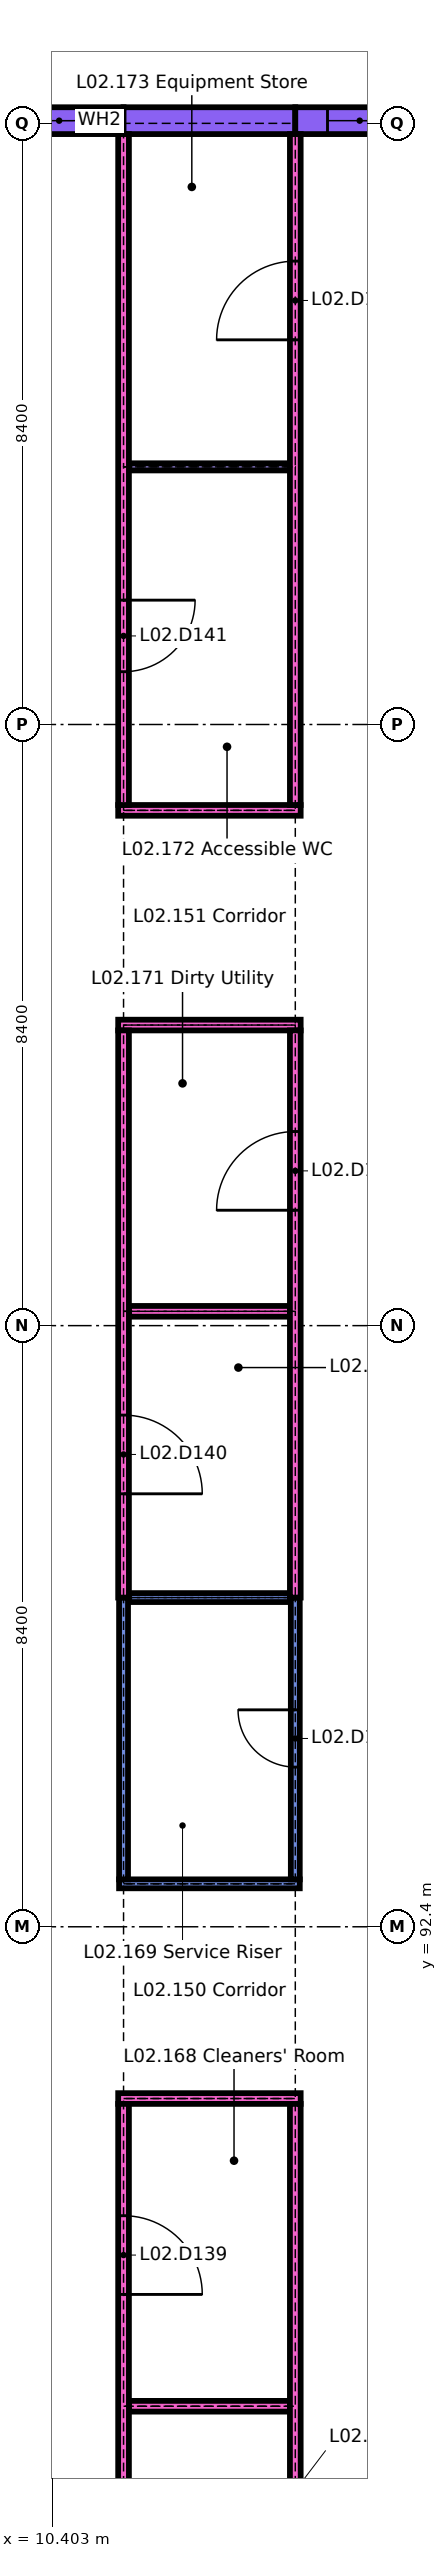
"""IFC4 building model, lengths in metres.
Left out: names, types, materials, properties, quantities, classifications, styles, units other than length and angle.
Written with IfcOpenShell. Run it as: python <this file> out.ifc"""

import sys

from ifc_helpers import new_model, si_unit, direction, frame, frame_2d, origin, place, context, subcontext, project, spatial, rectangle, extrude, element, fill, save


model = new_model("IFC4")
c1 = context("Model", 3, precision=1e-05, world=origin(), true_north=direction((0.0, 1.0)))
c2 = subcontext(c1, "Body", "Model", "MODEL_VIEW")
j1 = project(units=[si_unit("LENGTHUNIT", "METRE"), si_unit("PLANEANGLEUNIT", "RADIAN")], contexts=[c1])
p1 = place(None, origin())
s1 = spatial("IfcSite", under=j1, at=p1, CompositionType="ELEMENT")
p2 = place(p1, origin())
s2 = spatial("IfcBuilding", under=s1, at=p2, CompositionType="ELEMENT")
p3 = place(p2, frame((0.0, 0.0, 8.4)))
s3 = spatial("IfcBuildingStorey", under=s2, at=p3, CompositionType="ELEMENT", Elevation=8.4)
p4 = place(p3, frame((8.825, 117.637, 0.0), z_axis=(0.0, 0.0, 1.0), x_axis=(1.0, 0.0, 0.0)))
e1 = element("IfcWall", 1, at=p4, inside=s3, PredefinedType="SOLIDWALL", context=c2, shape_type="SweptSolid", body=[
    extrude(rectangle(XDim=2.575, YDim=0.375, at=frame_2d((1.288, 0.0))), origin(), (0.0, 0.0, 1.0), 4.2),
])
p5 = place(p4, frame((1.225, 0.0, 0.9)))
e2 = element("IfcOpeningElement", 2, at=p5, cuts=e1, PredefinedType="OPENING", context=c2, shape_type="SweptSolid", body=[
    extrude(rectangle(XDim=0.9, YDim=2.1, at=frame_2d((0.45, 1.05))), frame((0.0, 0.198, 0.0), z_axis=(0.0, -1.0, 0.0), x_axis=(1.0, 0.0, 0.0)), (0.0, 0.0, 1.0), 0.395),
])
p6 = place(p3, frame((11.4, 117.637, 0.0), z_axis=(0.0, 0.0, 1.0), x_axis=(1.0, 0.0, 0.0)))
e3 = element("IfcWall", 3, at=p6, inside=s3, PredefinedType="SOLIDWALL", context=c2, shape_type="SweptSolid", body=[
    extrude(rectangle(XDim=2.4, YDim=0.375, at=frame_2d((1.2, 0.0))), origin(), (0.0, 0.0, 1.0), 4.2),
])
p7 = place(p3, frame((13.8, 117.637, 0.0), z_axis=(0.0, 0.0, 1.0), x_axis=(1.0, 0.0, 0.0)))
e4 = element("IfcWall", 4, at=p7, inside=s3, PredefinedType="SOLIDWALL", context=c2, shape_type="SweptSolid", body=[
    extrude(rectangle(XDim=3.0, YDim=0.375, at=frame_2d((1.5, 0.0))), origin(), (0.0, 0.0, 1.0), 4.2),
])
p8 = place(p7, frame((0.45, 0.0, 0.9)))
e5 = element("IfcOpeningElement", 5, at=p8, cuts=e4, PredefinedType="OPENING", context=c2, shape_type="SweptSolid", body=[
    extrude(rectangle(XDim=0.9, YDim=2.1, at=frame_2d((0.45, 1.05))), frame((0.0, 0.198, 0.0), z_axis=(0.0, -1.0, 0.0), x_axis=(1.0, 0.0, 0.0)), (0.0, 0.0, 1.0), 0.395),
])
p9 = place(p3, frame((11.475, 85.7, 0.0), z_axis=(0.0, 0.0, 1.0), x_axis=(1.0, 0.0, 0.0)))
e6 = element("IfcWall", 6, at=p9, inside=s3, PredefinedType="PARTITIONING", context=c2, shape_type="SweptSolid", body=[
    extrude(rectangle(XDim=2.25, YDim=0.15, at=frame_2d((1.125, 0.0))), origin(), (0.0, 0.0, 1.0), 4.2),
])
p10 = place(p3, frame((11.325, 90.0, 0.0), z_axis=(0.0, 0.0, 1.0), x_axis=(1.0, 0.0, 0.0)))
e7 = element("IfcWall", 7, at=p10, inside=s3, PredefinedType="PARTITIONING", context=c2, shape_type="SweptSolid", body=[
    extrude(rectangle(XDim=2.55, YDim=0.15, at=frame_2d((1.275, 0.0))), origin(), (0.0, 0.0, 1.0), 4.2),
])
p11 = place(p3, frame((11.337, 93.0, 0.0), z_axis=(0.0, 0.0, 1.0), x_axis=(1.0, 0.0, 0.0)))
e8 = element("IfcWall", 8, at=p11, inside=s3, PredefinedType="SOLIDWALL", context=c2, shape_type="SweptSolid", body=[
    extrude(rectangle(XDim=2.525, YDim=0.125, at=frame_2d((1.263, 0.0))), origin(), (0.0, 0.0, 1.0), 4.2),
])
p12 = place(p3, frame((11.475, 97.0, 0.0), z_axis=(0.0, 0.0, 1.0), x_axis=(1.0, 0.0, 0.0)))
e9 = element("IfcWall", 9, at=p12, inside=s3, PredefinedType="SOLIDWALL", context=c2, shape_type="SweptSolid", body=[
    extrude(rectangle(XDim=2.25, YDim=0.125, at=frame_2d((1.125, 0.0))), origin(), (0.0, 0.0, 1.0), 4.2),
])
p13 = place(p3, frame((11.475, 101.0, 0.0), z_axis=(0.0, 0.0, 1.0), x_axis=(1.0, 0.0, 0.0)))
e10 = element("IfcWall", 10, at=p13, inside=s3, PredefinedType="PARTITIONING", context=c2, shape_type="SweptSolid", body=[
    extrude(rectangle(XDim=2.25, YDim=0.15, at=frame_2d((1.125, 0.0))), origin(), (0.0, 0.0, 1.0), 4.2),
])
for number, where, z_axis, x_axis in (
    (11, (11.325, 105.0, 0.0), (0.0, 0.0, 1.0), (1.0, 0.0, 0.0)),
    (12, (11.325, 108.0, 0.0), (0.0, 0.0, 1.0), (1.0, 0.0, 0.0)),
):
    element("IfcWall", number, at=place(p3, frame(where, z_axis=z_axis, x_axis=x_axis)), inside=s3, PredefinedType="PARTITIONING", context=c2, shape_type="SweptSolid", body=[
        extrude(rectangle(XDim=2.55, YDim=0.15, at=frame_2d((1.275, 0.0))), origin(), (0.0, 0.0, 1.0), 4.2),
    ])
p14 = place(p3, frame((11.475, 112.8, 0.0), z_axis=(0.0, 0.0, 1.0), x_axis=(1.0, 0.0, 0.0)))
e13 = element("IfcWall", 13, at=p14, inside=s3, PredefinedType="PARTITIONING", context=c2, shape_type="SweptSolid", body=[
    extrude(rectangle(XDim=2.25, YDim=0.1, at=frame_2d((1.125, 0.0))), origin(), (0.0, 0.0, 1.0), 4.2),
])
p15 = place(p3, frame((11.4, 57.075, 0.0), z_axis=(0.0, 0.0, 1.0), x_axis=(0.0, 1.0, 0.0)))
e14 = element("IfcWall", 14, at=p15, inside=s3, PredefinedType="PARTITIONING", context=c2, shape_type="SweptSolid", body=[
    extrude(rectangle(XDim=32.85, YDim=0.15, at=frame_2d((16.425, 0.0))), origin(), (0.0, 0.0, 1.0), 4.2),
])
p16 = place(p15, frame((5.525, 0.0, 0.0)))
e15 = element("IfcOpeningElement", 15, at=p16, cuts=e14, PredefinedType="OPENING", context=c2, shape_type="SweptSolid", body=[
    extrude(rectangle(XDim=1.1, YDim=2.1, at=frame_2d((0.55, 1.05))), frame((0.0, 0.085, 0.0), z_axis=(0.0, -1.0, 0.0), x_axis=(1.0, 0.0, 0.0)), (0.0, 0.0, 1.0), 0.17),
])
p17 = place(p15, frame((13.725, 0.0, 0.0)))
e16 = element("IfcOpeningElement", 16, at=p17, cuts=e14, PredefinedType="OPENING", context=c2, shape_type="SweptSolid", body=[
    extrude(rectangle(XDim=1.1, YDim=2.1, at=frame_2d((0.55, 1.05))), frame((0.0, 0.085, 0.0), z_axis=(0.0, -1.0, 0.0), x_axis=(1.0, 0.0, 0.0)), (0.0, 0.0, 1.0), 0.17),
])
p18 = place(p15, frame((21.925, 0.0, 0.0)))
e17 = element("IfcOpeningElement", 17, at=p18, cuts=e14, PredefinedType="OPENING", context=c2, shape_type="SweptSolid", body=[
    extrude(rectangle(XDim=1.1, YDim=2.1, at=frame_2d((0.55, 1.05))), frame((0.0, 0.085, 0.0), z_axis=(0.0, -1.0, 0.0), x_axis=(1.0, 0.0, 0.0)), (0.0, 0.0, 1.0), 0.17),
])
p19 = place(p15, frame((30.188, 0.0, 0.0)))
e18 = element("IfcOpeningElement", 18, at=p19, cuts=e14, PredefinedType="OPENING", context=c2, shape_type="SweptSolid", body=[
    extrude(rectangle(XDim=1.1, YDim=2.1, at=frame_2d((0.55, 1.05))), frame((0.0, 0.085, 0.0), z_axis=(0.0, -1.0, 0.0), x_axis=(1.0, 0.0, 0.0)), (0.0, 0.0, 1.0), 0.17),
])
p20 = place(p3, frame((11.4, 93.062, 0.0), z_axis=(0.0, 0.0, 1.0), x_axis=(0.0, 1.0, 0.0)))
e19 = element("IfcWall", 19, at=p20, inside=s3, PredefinedType="SOLIDWALL", context=c2, shape_type="SweptSolid", body=[
    extrude(rectangle(XDim=3.938, YDim=0.125, at=frame_2d((1.969, 0.0))), origin(), (0.0, 0.0, 1.0), 4.2),
])
p21 = place(p3, frame((11.4, 97.0, 0.0), z_axis=(0.0, 0.0, 1.0), x_axis=(0.0, 1.0, 0.0)))
e20 = element("IfcWall", 20, at=p21, inside=s3, PredefinedType="PARTITIONING", context=c2, shape_type="SweptSolid", body=[
    extrude(rectangle(XDim=7.925, YDim=0.15, at=frame_2d((3.962, 0.0))), origin(), (0.0, 0.0, 1.0), 4.2),
])
p22 = place(p21, frame((1.45, 0.0, 0.0)))
e21 = element("IfcOpeningElement", 21, at=p22, cuts=e20, PredefinedType="OPENING", context=c2, shape_type="SweptSolid", body=[
    extrude(rectangle(XDim=1.1, YDim=2.1, at=frame_2d((0.55, 1.05))), frame((0.0, 0.085, 0.0), z_axis=(0.0, -1.0, 0.0), x_axis=(1.0, 0.0, 0.0)), (0.0, 0.0, 1.0), 0.17),
])
p23 = place(p3, frame((11.4, 108.075, 0.0), z_axis=(0.0, 0.0, 1.0), x_axis=(0.0, 1.0, 0.0)))
e22 = element("IfcWall", 22, at=p23, inside=s3, PredefinedType="PARTITIONING", context=c2, shape_type="SweptSolid", body=[
    extrude(rectangle(XDim=9.375, YDim=0.15, at=frame_2d((4.688, 0.0))), origin(), (0.0, 0.0, 1.0), 4.2),
])
p24 = place(p23, frame((1.863, 0.0, 0.0)))
e23 = element("IfcOpeningElement", 23, at=p24, cuts=e22, PredefinedType="OPENING", context=c2, shape_type="SweptSolid", body=[
    extrude(rectangle(XDim=1.0, YDim=2.1, at=frame_2d((0.5, 1.05))), frame((0.0, 0.085, 0.0), z_axis=(0.0, -1.0, 0.0), x_axis=(1.0, 0.0, 0.0)), (0.0, 0.0, 1.0), 0.17),
])
p25 = place(p3, frame((13.8, 57.075, 0.0), z_axis=(0.0, 0.0, 1.0), x_axis=(0.0, 1.0, 0.0)))
e24 = element("IfcWall", 24, at=p25, inside=s3, PredefinedType="PARTITIONING", context=c2, shape_type="SweptSolid", body=[
    extrude(rectangle(XDim=32.85, YDim=0.15, at=frame_2d((16.425, 0.0))), origin(), (0.0, 0.0, 1.0), 4.2),
])
p26 = place(p25, frame((1.462, 0.0, 0.0)))
e25 = element("IfcOpeningElement", 25, at=p26, cuts=e24, PredefinedType="OPENING", context=c2, shape_type="SweptSolid", body=[
    extrude(rectangle(XDim=1.1, YDim=2.1, at=frame_2d((0.55, 1.05))), frame((0.0, 0.085, 0.0), z_axis=(0.0, -1.0, 0.0), x_axis=(1.0, 0.0, 0.0)), (0.0, 0.0, 1.0), 0.17),
])
p27 = place(p25, frame((9.675, 0.0, 0.0)))
e26 = element("IfcOpeningElement", 26, at=p27, cuts=e24, PredefinedType="OPENING", context=c2, shape_type="SweptSolid", body=[
    extrude(rectangle(XDim=1.0, YDim=2.1, at=frame_2d((0.5, 1.05))), frame((0.0, 0.085, 0.0), z_axis=(0.0, -1.0, 0.0), x_axis=(1.0, 0.0, 0.0)), (0.0, 0.0, 1.0), 0.17),
])
p28 = place(p25, frame((17.875, 0.0, 0.0)))
e27 = element("IfcOpeningElement", 27, at=p28, cuts=e24, PredefinedType="OPENING", context=c2, shape_type="SweptSolid", body=[
    extrude(rectangle(XDim=1.0, YDim=2.1, at=frame_2d((0.5, 1.05))), frame((0.0, 0.085, 0.0), z_axis=(0.0, -1.0, 0.0), x_axis=(1.0, 0.0, 0.0)), (0.0, 0.0, 1.0), 0.17),
])
p29 = place(p25, frame((26.075, 0.0, 0.0)))
e28 = element("IfcOpeningElement", 28, at=p29, cuts=e24, PredefinedType="OPENING", context=c2, shape_type="SweptSolid", body=[
    extrude(rectangle(XDim=1.0, YDim=2.1, at=frame_2d((0.5, 1.05))), frame((0.0, 0.085, 0.0), z_axis=(0.0, -1.0, 0.0), x_axis=(1.0, 0.0, 0.0)), (0.0, 0.0, 1.0), 0.17),
])
p30 = place(p3, frame((13.8, 93.062, 0.0), z_axis=(0.0, 0.0, 1.0), x_axis=(0.0, 1.0, 0.0)))
e29 = element("IfcWall", 29, at=p30, inside=s3, PredefinedType="SOLIDWALL", context=c2, shape_type="SweptSolid", body=[
    extrude(rectangle(XDim=3.938, YDim=0.125, at=frame_2d((1.969, 0.0))), origin(), (0.0, 0.0, 1.0), 4.2),
])
p31 = place(p30, frame((1.569, 0.0, 0.0)))
e30 = element("IfcOpeningElement", 30, at=p31, cuts=e29, PredefinedType="OPENING", context=c2, shape_type="SweptSolid", body=[
    extrude(rectangle(XDim=0.8, YDim=2.1, at=frame_2d((0.4, 1.05))), frame((0.0, 0.073, 0.0), z_axis=(0.0, -1.0, 0.0), x_axis=(1.0, 0.0, 0.0)), (0.0, 0.0, 1.0), 0.145),
])
p32 = place(p3, frame((13.8, 97.0, 0.0), z_axis=(0.0, 0.0, 1.0), x_axis=(0.0, 1.0, 0.0)))
e31 = element("IfcWall", 31, at=p32, inside=s3, PredefinedType="PARTITIONING", context=c2, shape_type="SweptSolid", body=[
    extrude(rectangle(XDim=7.925, YDim=0.15, at=frame_2d((3.962, 0.0))), origin(), (0.0, 0.0, 1.0), 4.2),
])
p33 = place(p32, frame((5.413, 0.0, 0.0)))
e32 = element("IfcOpeningElement", 32, at=p33, cuts=e31, PredefinedType="OPENING", context=c2, shape_type="SweptSolid", body=[
    extrude(rectangle(XDim=1.1, YDim=2.1, at=frame_2d((0.55, 1.05))), frame((0.0, 0.085, 0.0), z_axis=(0.0, -1.0, 0.0), x_axis=(1.0, 0.0, 0.0)), (0.0, 0.0, 1.0), 0.17),
])
p34 = place(p3, frame((13.8, 108.075, 0.0), z_axis=(0.0, 0.0, 1.0), x_axis=(0.0, 1.0, 0.0)))
e33 = element("IfcWall", 33, at=p34, inside=s3, PredefinedType="PARTITIONING", context=c2, shape_type="SweptSolid", body=[
    extrude(rectangle(XDim=9.375, YDim=0.15, at=frame_2d((4.688, 0.0))), origin(), (0.0, 0.0, 1.0), 4.2),
])
p35 = place(p34, frame((6.5, 0.0, 0.0)))
e34 = element("IfcOpeningElement", 34, at=p35, cuts=e33, PredefinedType="OPENING", context=c2, shape_type="SweptSolid", body=[
    extrude(rectangle(XDim=1.1, YDim=2.1, at=frame_2d((0.55, 1.05))), frame((0.0, 0.085, 0.0), z_axis=(0.0, -1.0, 0.0), x_axis=(1.0, 0.0, 0.0)), (0.0, 0.0, 1.0), 0.17),
])
p36 = place(p5, origin())
e35 = element("IfcWindow", 35, at=p36, inside=s3, PartitioningType="SINGLE_PANEL", PredefinedType="WINDOW", context=c2, shape_type="SweptSolid", body=[
    extrude(rectangle(XDim=0.9, YDim=2.1, at=frame_2d((0.45, 1.05))), frame((0.0, 0.03, 0.0), z_axis=(0.0, -1.0, 0.0), x_axis=(1.0, 0.0, 0.0)), (0.0, 0.0, 1.0), 0.06),
])
fill(e2, e35)
p37 = place(p8, origin())
e36 = element("IfcWindow", 36, at=p37, inside=s3, PartitioningType="SINGLE_PANEL", PredefinedType="WINDOW", context=c2, shape_type="SweptSolid", body=[
    extrude(rectangle(XDim=0.9, YDim=2.1, at=frame_2d((0.45, 1.05))), frame((0.0, 0.03, 0.0), z_axis=(0.0, -1.0, 0.0), x_axis=(1.0, 0.0, 0.0)), (0.0, 0.0, 1.0), 0.06),
])
fill(e5, e36)
p38 = place(p19, origin())
e37 = element("IfcDoor", 37, at=p38, inside=s3, OperationType="SINGLE_SWING_LEFT", PredefinedType="DOOR", context=c2, shape_type="SweptSolid", body=[
    extrude(rectangle(XDim=1.1, YDim=2.1, at=frame_2d((0.55, 1.05))), frame((0.0, 0.025, 0.0), z_axis=(0.0, -1.0, 0.0), x_axis=(1.0, 0.0, 0.0)), (0.0, 0.0, 1.0), 0.05),
])
fill(e18, e37)
p39 = place(p22, origin())
e38 = element("IfcDoor", 38, at=p39, inside=s3, OperationType="SINGLE_SWING_LEFT", PredefinedType="DOOR", context=c2, shape_type="SweptSolid", body=[
    extrude(rectangle(XDim=1.1, YDim=2.1, at=frame_2d((0.55, 1.05))), frame((0.0, 0.025, 0.0), z_axis=(0.0, -1.0, 0.0), x_axis=(1.0, 0.0, 0.0)), (0.0, 0.0, 1.0), 0.05),
])
fill(e21, e38)
p40 = place(p24, origin())
e39 = element("IfcDoor", 39, at=p40, inside=s3, OperationType="SINGLE_SWING_RIGHT", PredefinedType="DOOR", context=c2, shape_type="SweptSolid", body=[
    extrude(rectangle(XDim=1.0, YDim=2.1, at=frame_2d((0.5, 1.05))), frame((0.0, 0.025, 0.0), z_axis=(0.0, -1.0, 0.0), x_axis=(1.0, 0.0, 0.0)), (0.0, 0.0, 1.0), 0.05),
])
fill(e23, e39)
p41 = place(p31, origin())
e40 = element("IfcDoor", 40, at=p41, inside=s3, OperationType="SINGLE_SWING_LEFT", PredefinedType="DOOR", context=c2, shape_type="SweptSolid", body=[
    extrude(rectangle(XDim=0.8, YDim=2.1, at=frame_2d((0.4, 1.05))), frame((0.0, 0.03, 0.0), z_axis=(0.0, -1.0, 0.0), x_axis=(1.0, 0.0, 0.0)), (0.0, 0.0, 1.0), 0.06),
])
fill(e30, e40)
p42 = place(p33, origin())
e41 = element("IfcDoor", 41, at=p42, inside=s3, OperationType="SINGLE_SWING_RIGHT", PredefinedType="DOOR", context=c2, shape_type="SweptSolid", body=[
    extrude(rectangle(XDim=1.1, YDim=2.1, at=frame_2d((0.55, 1.05))), frame((0.0, 0.025, 0.0), z_axis=(0.0, -1.0, 0.0), x_axis=(1.0, 0.0, 0.0)), (0.0, 0.0, 1.0), 0.05),
])
fill(e32, e41)
p43 = place(p35, origin())
e42 = element("IfcDoor", 42, at=p43, inside=s3, OperationType="SINGLE_SWING_RIGHT", PredefinedType="DOOR", context=c2, shape_type="SweptSolid", body=[
    extrude(rectangle(XDim=1.1, YDim=2.1, at=frame_2d((0.55, 1.05))), frame((0.0, 0.025, 0.0), z_axis=(0.0, -1.0, 0.0), x_axis=(1.0, 0.0, 0.0)), (0.0, 0.0, 1.0), 0.05),
])
fill(e34, e42)
save(model, sys.argv[1])
